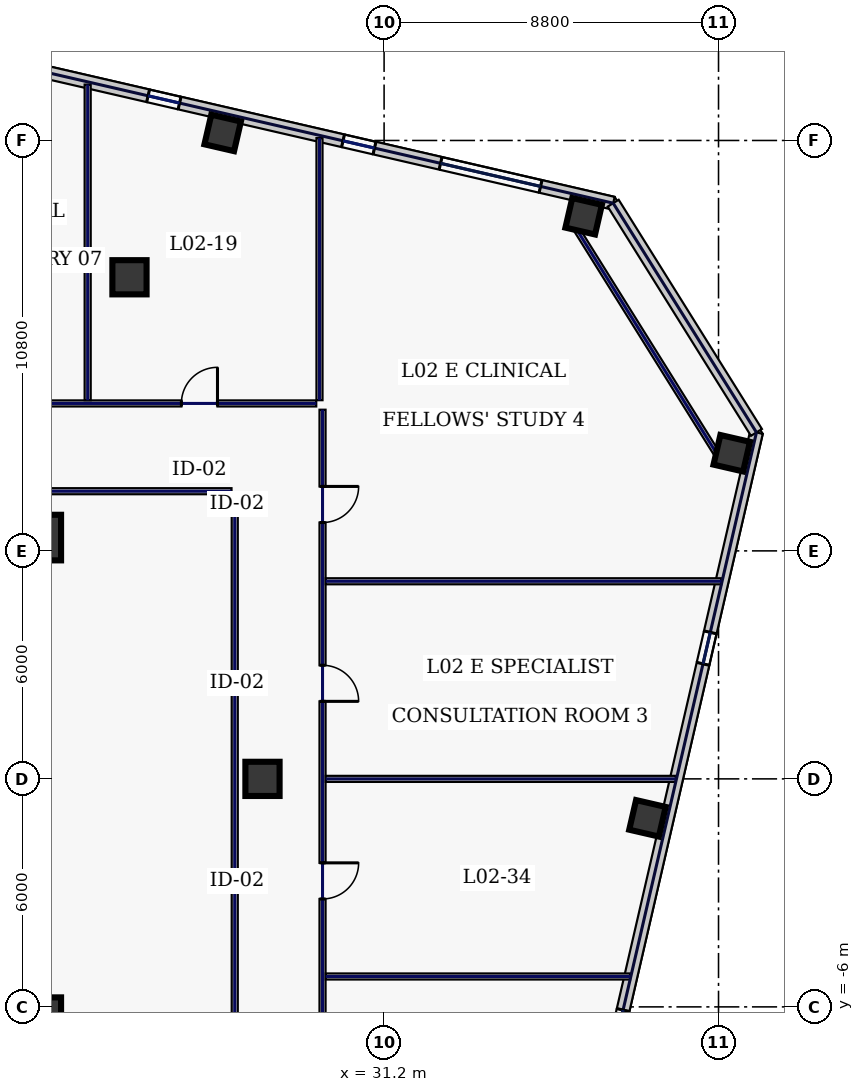
"""IFC4 building model, lengths in metres.
Left out: names, types, materials, properties, quantities, classifications, styles, units other than length and angle.
Written with IfcOpenShell. Run it as: python <this file> out.ifc"""

import sys

from ifc_helpers import new_model, si_unit, direction, frame, frame_2d, origin, origin_2d, place, context, subcontext, project, spatial, rectangle, hollow_rectangle, extrude, element, fill, save


model = new_model("IFC4")
c1 = context("Model", 3, precision=1e-05, world=origin(), true_north=direction((0.0, 1.0)))
c2 = subcontext(c1, "Body", "Model", "MODEL_VIEW")
j1 = project(units=[si_unit("LENGTHUNIT", "METRE"), si_unit("PLANEANGLEUNIT", "RADIAN")], contexts=[c1])
p1 = place(None, origin())
s1 = spatial("IfcSite", under=j1, at=p1, CompositionType="ELEMENT")
p2 = place(p1, origin())
s2 = spatial("IfcBuilding", under=s1, at=p2, CompositionType="ELEMENT")
p3 = place(p2, frame((0.0, 0.0, 13.4)))
s3 = spatial("IfcBuildingStorey", under=s2, at=p3, CompositionType="ELEMENT", Elevation=13.4)
for number, where, z_axis, x_axis in (
    (1, (22.1, -6.35, 0.0), (0.0, 0.0, 1.0), (1.0, 0.0, 0.0)),
    (2, (22.1, 6.35, 0.0), (0.0, 0.0, 1.0), (1.0, 0.0, 0.0)),
):
    element("IfcColumn", number, at=place(p3, frame(where, z_axis=z_axis, x_axis=x_axis)), inside=s3, PredefinedType="COLUMN", context=c2, shape_type="SweptSolid", body=[
        extrude(hollow_rectangle(XDim=1.2, YDim=1.2, WallThickness=0.05, at=origin_2d()), origin(), (0.0, 0.0, 1.0), 4.7),
    ])
for number, where, z_axis, x_axis in (
    (3, (24.5, 13.2, 0.0), (0.0, 0.0, 1.0), (1.0, 0.0, 0.0)),
    (4, (28.0, 0.0, 0.0), (0.0, 0.0, 1.0), (1.0, 0.0, 0.0)),
):
    element("IfcColumn", number, at=place(p3, frame(where, z_axis=z_axis, x_axis=x_axis)), inside=s3, PredefinedType="COLUMN", context=c2, shape_type="SweptSolid", body=[
        extrude(hollow_rectangle(XDim=0.9, YDim=0.9, WallThickness=0.04, at=origin_2d()), origin(), (0.0, 0.0, 1.0), 4.7),
    ])
for number, where, z_axis, x_axis in (
    (5, (36.451, 14.806, 0.0), (0.0, 0.0, 1.0), (0.974, -0.225, 0.0)),
    (6, (26.952, 16.999, 0.0), (0.0, 0.0, 1.0), (0.974, -0.225, 0.0)),
    (7, (38.13, -1.038, 0.0), (0.0, 0.0, 1.0), (0.974, -0.225, 0.0)),
    (8, (40.348, 8.57, 0.0), (0.0, 0.0, 1.0), (0.974, -0.225, 0.0)),
):
    element("IfcColumn", number, at=place(p3, frame(where, z_axis=z_axis, x_axis=x_axis)), inside=s3, PredefinedType="COLUMN", context=c2, shape_type="SweptSolid", body=[
        extrude(hollow_rectangle(XDim=0.8, YDim=0.8, WallThickness=0.036, at=origin_2d()), origin(), (0.0, 0.0, 1.0), 4.7),
    ])
p4 = place(p3, frame((37.229, 15.15, 0.0), z_axis=(0.0, 0.0, 1.0), x_axis=(-0.97436993772, 0.224951604723, 0.0)))
e9 = element("IfcWall", 9, at=p4, inside=s3, PredefinedType="STANDARD", context=c2, shape_type="SweptSolid", body=[
    extrude(rectangle(XDim=22.651, YDim=0.34, at=frame_2d((11.326, 0.0))), origin(), (0.0, 0.0, 1.0), 4.7),
])
p5 = place(p4, frame((16.195, 0.0, 0.9)))
e10 = element("IfcOpeningElement", 10, at=p5, cuts=e9, PredefinedType="OPENING", context=c2, shape_type="SweptSolid", body=[
    extrude(rectangle(XDim=2.7, YDim=2.2, at=frame_2d((1.35, 1.1))), frame((0.0, 0.18, 0.0), z_axis=(0.0, -1.0, 0.0), x_axis=(1.0, 0.0, 0.0)), (0.0, 0.0, 1.0), 0.36),
])
p6 = place(p4, frame((11.711, 0.0, 0.9)))
e11 = element("IfcOpeningElement", 11, at=p6, cuts=e9, PredefinedType="OPENING", context=c2, shape_type="SweptSolid", body=[
    extrude(rectangle(XDim=0.85, YDim=1.85, at=frame_2d((0.425, 0.925))), frame((0.0, 0.18, 0.0), z_axis=(0.0, -1.0, 0.0), x_axis=(1.0, 0.0, 0.0)), (0.0, 0.0, 1.0), 0.36),
])
p7 = place(p4, frame((6.447, 0.0, 0.9)))
e12 = element("IfcOpeningElement", 12, at=p7, cuts=e9, PredefinedType="OPENING", context=c2, shape_type="SweptSolid", body=[
    extrude(rectangle(XDim=0.85, YDim=1.85, at=frame_2d((0.425, 0.925))), frame((0.0, 0.18, 0.0), z_axis=(0.0, -1.0, 0.0), x_axis=(1.0, 0.0, 0.0)), (0.0, 0.0, 1.0), 0.36),
])
p8 = place(p4, frame((1.962, 0.0, 0.9)))
e13 = element("IfcOpeningElement", 13, at=p8, cuts=e9, PredefinedType="OPENING", context=c2, shape_type="SweptSolid", body=[
    extrude(rectangle(XDim=2.7, YDim=2.2, at=frame_2d((1.35, 1.1))), frame((0.0, 0.18, 0.0), z_axis=(0.0, -1.0, 0.0), x_axis=(1.0, 0.0, 0.0)), (0.0, 0.0, 1.0), 0.36),
])
p9 = place(p3, frame((31.82, -30.637, 0.0), z_axis=(0.0, 0.0, 1.0), x_axis=(0.224949969076, 0.974370315338, 0.0)))
e14 = element("IfcWall", 14, at=p9, inside=s3, PredefinedType="STANDARD", context=c2, shape_type="SweptSolid", body=[
    extrude(rectangle(XDim=40.8, YDim=0.34, at=frame_2d((20.4, 0.0))), origin(), (0.0, 0.0, 1.0), 4.7),
])
p10 = place(p9, frame((4.3, 0.0, 0.58)))
e15 = element("IfcOpeningElement", 15, at=p10, cuts=e14, PredefinedType="OPENING", context=c2, shape_type="SweptSolid", body=[
    extrude(rectangle(XDim=1.6, YDim=2.3, at=frame_2d((0.8, 1.15))), frame((0.0, 0.18, 0.0), z_axis=(0.0, -1.0, 0.0), x_axis=(1.0, 0.0, 0.0)), (0.0, 0.0, 1.0), 0.36),
])
p11 = place(p9, frame((14.5, 0.0, 0.58)))
e16 = element("IfcOpeningElement", 16, at=p11, cuts=e14, PredefinedType="OPENING", context=c2, shape_type="SweptSolid", body=[
    extrude(rectangle(XDim=1.6, YDim=2.3, at=frame_2d((0.8, 1.15))), frame((0.0, 0.18, 0.0), z_axis=(0.0, -1.0, 0.0), x_axis=(1.0, 0.0, 0.0)), (0.0, 0.0, 1.0), 0.36),
])
p12 = place(p9, frame((24.35, 0.0, 0.75)))
e17 = element("IfcOpeningElement", 17, at=p12, cuts=e14, PredefinedType="OPENING", context=c2, shape_type="SweptSolid", body=[
    extrude(rectangle(XDim=0.85, YDim=1.85, at=frame_2d((0.425, 0.925))), frame((0.0, 0.18, 0.0), z_axis=(0.0, -1.0, 0.0), x_axis=(1.0, 0.0, 0.0)), (0.0, 0.0, 1.0), 0.36),
])
p13 = place(p9, frame((34.55, 0.0, 0.75)))
e18 = element("IfcOpeningElement", 18, at=p13, cuts=e14, PredefinedType="OPENING", context=c2, shape_type="SweptSolid", body=[
    extrude(rectangle(XDim=0.85, YDim=1.85, at=frame_2d((0.425, 0.925))), frame((0.0, 0.18, 0.0), z_axis=(0.0, -1.0, 0.0), x_axis=(1.0, 0.0, 0.0)), (0.0, 0.0, 1.0), 0.36),
])
p14 = place(p3, frame((40.998, 9.117, 0.0), z_axis=(0.0, 0.0, 1.0), x_axis=(-0.529921811158, 0.848046504656, 0.0)))
e19 = element("IfcWall", 19, at=p14, inside=s3, PredefinedType="STANDARD", context=c2, shape_type="SweptSolid", body=[
    extrude(rectangle(XDim=7.113, YDim=0.34, at=frame_2d((3.557, 0.0))), origin(), (0.0, 0.0, 1.0), 4.7),
])
p15 = place(p3, frame((40.06, 8.389, 0.0), z_axis=(0.0, 0.0, 1.0), x_axis=(-0.529927317139, 0.848043064089, 0.0)))
e20 = element("IfcWall", 20, at=p15, inside=s3, PredefinedType="PARTITIONING", context=c2, shape_type="SweptSolid", body=[
    extrude(rectangle(XDim=7.354, YDim=0.16, at=frame_2d((3.677, 0.0))), origin(), (0.0, 0.0, 1.0), 4.7),
])
p16 = place(p3, frame((-29.415, 9.88, 0.0), z_axis=(0.0, 0.0, 1.0), x_axis=(1.0, 0.0, 0.0)))
e21 = element("IfcWall", 21, at=p16, inside=s3, PredefinedType="PARTITIONING", context=c2, shape_type="SweptSolid", body=[
    extrude(rectangle(XDim=58.83, YDim=0.16, at=frame_2d((29.415, 0.0))), origin(), (0.0, 0.0, 1.0), 4.7),
])
p17 = place(p16, frame((2.044, 0.0, 0.0)))
e22 = element("IfcOpeningElement", 22, at=p17, cuts=e21, PredefinedType="OPENING", context=c2, shape_type="SweptSolid", body=[
    extrude(rectangle(XDim=0.95, YDim=2.2, at=frame_2d((0.475, 1.1))), frame((0.0, 0.09, 0.0), z_axis=(0.0, -1.0, 0.0), x_axis=(1.0, 0.0, 0.0)), (0.0, 0.0, 1.0), 0.18),
])
p18 = place(p16, frame((7.5, 0.0, 0.0)))
e23 = element("IfcOpeningElement", 23, at=p18, cuts=e21, PredefinedType="OPENING", context=c2, shape_type="SweptSolid", body=[
    extrude(rectangle(XDim=0.95, YDim=2.2, at=frame_2d((0.475, 1.1))), frame((0.0, 0.09, 0.0), z_axis=(0.0, -1.0, 0.0), x_axis=(1.0, 0.0, 0.0)), (0.0, 0.0, 1.0), 0.18),
])
p19 = place(p16, frame((14.725, 0.0, 0.0)))
e24 = element("IfcOpeningElement", 24, at=p19, cuts=e21, PredefinedType="OPENING", context=c2, shape_type="SweptSolid", body=[
    extrude(rectangle(XDim=0.95, YDim=2.2, at=frame_2d((0.475, 1.1))), frame((0.0, 0.09, 0.0), z_axis=(0.0, -1.0, 0.0), x_axis=(1.0, 0.0, 0.0)), (0.0, 0.0, 1.0), 0.18),
])
p20 = place(p16, frame((23.025, 0.0, 0.0)))
e25 = element("IfcOpeningElement", 25, at=p20, cuts=e21, PredefinedType="OPENING", context=c2, shape_type="SweptSolid", body=[
    extrude(rectangle(XDim=0.95, YDim=2.2, at=frame_2d((0.475, 1.1))), frame((0.0, 0.09, 0.0), z_axis=(0.0, -1.0, 0.0), x_axis=(1.0, 0.0, 0.0)), (0.0, 0.0, 1.0), 0.18),
])
p21 = place(p16, frame((32.125, 0.0, 0.0)))
e26 = element("IfcOpeningElement", 26, at=p21, cuts=e21, PredefinedType="OPENING", context=c2, shape_type="SweptSolid", body=[
    extrude(rectangle(XDim=0.95, YDim=2.2, at=frame_2d((0.475, 1.1))), frame((0.0, 0.09, 0.0), z_axis=(0.0, -1.0, 0.0), x_axis=(1.0, 0.0, 0.0)), (0.0, 0.0, 1.0), 0.18),
])
p22 = place(p16, frame((41.025, 0.0, 0.0)))
e27 = element("IfcOpeningElement", 27, at=p22, cuts=e21, PredefinedType="OPENING", context=c2, shape_type="SweptSolid", body=[
    extrude(rectangle(XDim=0.95, YDim=2.2, at=frame_2d((0.475, 1.1))), frame((0.0, 0.09, 0.0), z_axis=(0.0, -1.0, 0.0), x_axis=(1.0, 0.0, 0.0)), (0.0, 0.0, 1.0), 0.18),
])
p23 = place(p16, frame((48.825, 0.0, 0.0)))
e28 = element("IfcOpeningElement", 28, at=p23, cuts=e21, PredefinedType="OPENING", context=c2, shape_type="SweptSolid", body=[
    extrude(rectangle(XDim=0.95, YDim=2.2, at=frame_2d((0.475, 1.1))), frame((0.0, 0.09, 0.0), z_axis=(0.0, -1.0, 0.0), x_axis=(1.0, 0.0, 0.0)), (0.0, 0.0, 1.0), 0.18),
])
p24 = place(p16, frame((55.281, 0.0, 0.0)))
e29 = element("IfcOpeningElement", 29, at=p24, cuts=e21, PredefinedType="OPENING", context=c2, shape_type="SweptSolid", body=[
    extrude(rectangle(XDim=0.95, YDim=2.2, at=frame_2d((0.475, 1.1))), frame((0.0, 0.09, 0.0), z_axis=(0.0, -1.0, 0.0), x_axis=(1.0, 0.0, 0.0)), (0.0, 0.0, 1.0), 0.18),
])
p25 = place(p3, frame((29.58, 9.715, 0.0), z_axis=(0.0, 0.0, 1.0), x_axis=(0.0, -1.0, 0.0)))
e30 = element("IfcWall", 30, at=p25, inside=s3, PredefinedType="PARTITIONING", context=c2, shape_type="SweptSolid", body=[
    extrude(rectangle(XDim=19.43, YDim=0.16, at=frame_2d((9.715, 0.0))), origin(), (0.0, 0.0, 1.0), 4.7),
])
p26 = place(p25, frame((16.631, 0.0, 0.0)))
e31 = element("IfcOpeningElement", 31, at=p26, cuts=e30, PredefinedType="OPENING", context=c2, shape_type="SweptSolid", body=[
    extrude(rectangle(XDim=0.95, YDim=2.2, at=frame_2d((0.475, 1.1))), frame((0.0, 0.09, 0.0), z_axis=(0.0, -1.0, 0.0), x_axis=(1.0, 0.0, 0.0)), (0.0, 0.0, 1.0), 0.18),
])
p27 = place(p25, frame((11.925, 0.0, 0.0)))
e32 = element("IfcOpeningElement", 32, at=p27, cuts=e30, PredefinedType="OPENING", context=c2, shape_type="SweptSolid", body=[
    extrude(rectangle(XDim=0.95, YDim=2.2, at=frame_2d((0.475, 1.1))), frame((0.0, 0.09, 0.0), z_axis=(0.0, -1.0, 0.0), x_axis=(1.0, 0.0, 0.0)), (0.0, 0.0, 1.0), 0.18),
])
p28 = place(p25, frame((6.725, 0.0, 0.0)))
e33 = element("IfcOpeningElement", 33, at=p28, cuts=e30, PredefinedType="OPENING", context=c2, shape_type="SweptSolid", body=[
    extrude(rectangle(XDim=0.95, YDim=2.2, at=frame_2d((0.475, 1.1))), frame((0.0, 0.09, 0.0), z_axis=(0.0, -1.0, 0.0), x_axis=(1.0, 0.0, 0.0)), (0.0, 0.0, 1.0), 0.18),
])
p29 = place(p25, frame((2.019, 0.0, 0.0)))
e34 = element("IfcOpeningElement", 34, at=p29, cuts=e30, PredefinedType="OPENING", context=c2, shape_type="SweptSolid", body=[
    extrude(rectangle(XDim=0.95, YDim=2.2, at=frame_2d((0.475, 1.1))), frame((0.0, 0.09, 0.0), z_axis=(0.0, -1.0, 0.0), x_axis=(1.0, 0.0, 0.0)), (0.0, 0.0, 1.0), 0.18),
])
p30 = place(p3, frame((27.185, 7.57, 0.0), z_axis=(0.0, 0.0, 1.0), x_axis=(-1.0, 0.0, 0.0)))
e35 = element("IfcWall", 35, at=p30, inside=s3, PredefinedType="PARTITIONING", context=c2, shape_type="SweptSolid", body=[
    extrude(rectangle(XDim=16.52, YDim=0.16, at=frame_2d((8.26, 0.0))), origin(), (0.0, 0.0, 1.0), 4.7),
])
p31 = place(p3, frame((27.27, -7.485, 0.0), z_axis=(0.0, 0.0, 1.0), x_axis=(0.0, 1.0, 0.0)))
e36 = element("IfcWall", 36, at=p31, inside=s3, PredefinedType="PARTITIONING", context=c2, shape_type="SweptSolid", body=[
    extrude(rectangle(XDim=14.97, YDim=0.16, at=frame_2d((7.485, 0.0))), origin(), (0.0, 0.0, 1.0), 4.7),
])
p32 = place(p3, frame((29.5, 9.965, 0.0), z_axis=(0.0, 0.0, 1.0), x_axis=(0.0, 1.0, 0.0)))
e37 = element("IfcWall", 37, at=p32, inside=s3, PredefinedType="PARTITIONING", context=c2, shape_type="SweptSolid", body=[
    extrude(rectangle(XDim=6.897, YDim=0.16, at=frame_2d((3.449, 0.0))), origin(), (0.0, 0.0, 1.0), 4.7),
])
p33 = place(p3, frame((23.4, 9.965, 0.0), z_axis=(0.0, 0.0, 1.0), x_axis=(0.0, 1.0, 0.0)))
e38 = element("IfcWall", 38, at=p33, inside=s3, PredefinedType="PARTITIONING", context=c2, shape_type="SweptSolid", body=[
    extrude(rectangle(XDim=8.306, YDim=0.16, at=frame_2d((4.153, 0.0))), origin(), (0.0, 0.0, 1.0), 4.7),
])
p34 = place(p3, frame((29.665, -5.2, 0.0), z_axis=(0.0, 0.0, 1.0), x_axis=(1.0, 0.0, 0.0)))
e39 = element("IfcWall", 39, at=p34, inside=s3, PredefinedType="PARTITIONING", context=c2, shape_type="SweptSolid", body=[
    extrude(rectangle(XDim=8.007, YDim=0.16, at=frame_2d((4.003, 0.0))), origin(), (0.0, 0.0, 1.0), 4.7),
])
p35 = place(p3, frame((29.665, 0.0, 0.0), z_axis=(0.0, 0.0, 1.0), x_axis=(1.0, 0.0, 0.0)))
e40 = element("IfcWall", 40, at=p35, inside=s3, PredefinedType="PARTITIONING", context=c2, shape_type="SweptSolid", body=[
    extrude(rectangle(XDim=9.208, YDim=0.16, at=frame_2d((4.604, 0.0))), origin(), (0.0, 0.0, 1.0), 4.195),
])
p36 = place(p3, frame((29.665, 5.2, 0.0), z_axis=(0.0, 0.0, 1.0), x_axis=(1.0, 0.0, 0.0)))
e41 = element("IfcWall", 41, at=p36, inside=s3, PredefinedType="PARTITIONING", context=c2, shape_type="SweptSolid", body=[
    extrude(rectangle(XDim=10.408, YDim=0.16, at=frame_2d((5.204, 0.0))), origin(), (0.0, 0.0, 1.0), 4.7),
])
p37 = place(p6, origin())
e42 = element("IfcWindow", 42, at=p37, inside=s3, PartitioningType="SINGLE_PANEL", PredefinedType="WINDOW", context=c2, shape_type="SweptSolid", body=[
    extrude(rectangle(XDim=0.85, YDim=1.85, at=frame_2d((0.425, 0.925))), frame((0.0, 0.03, 0.0), z_axis=(0.0, -1.0, 0.0), x_axis=(1.0, 0.0, 0.0)), (0.0, 0.0, 1.0), 0.06),
])
fill(e11, e42)
p38 = place(p7, origin())
e43 = element("IfcWindow", 43, at=p38, inside=s3, PartitioningType="SINGLE_PANEL", PredefinedType="WINDOW", context=c2, shape_type="SweptSolid", body=[
    extrude(rectangle(XDim=0.85, YDim=1.85, at=frame_2d((0.425, 0.925))), frame((0.0, 0.03, 0.0), z_axis=(0.0, -1.0, 0.0), x_axis=(1.0, 0.0, 0.0)), (0.0, 0.0, 1.0), 0.06),
])
fill(e12, e43)
p39 = place(p8, origin())
e44 = element("IfcWindow", 44, at=p39, inside=s3, PartitioningType="SINGLE_PANEL", PredefinedType="WINDOW", context=c2, shape_type="SweptSolid", body=[
    extrude(rectangle(XDim=2.7, YDim=2.2, at=frame_2d((1.35, 1.1))), frame((0.0, 0.03, 0.0), z_axis=(0.0, -1.0, 0.0), x_axis=(1.0, 0.0, 0.0)), (0.0, 0.0, 1.0), 0.06),
])
fill(e13, e44)
p40 = place(p12, origin())
e45 = element("IfcWindow", 45, at=p40, inside=s3, PartitioningType="SINGLE_PANEL", PredefinedType="WINDOW", context=c2, shape_type="SweptSolid", body=[
    extrude(rectangle(XDim=0.85, YDim=1.85, at=frame_2d((0.425, 0.925))), frame((0.0, 0.03, 0.0), z_axis=(0.0, -1.0, 0.0), x_axis=(1.0, 0.0, 0.0)), (0.0, 0.0, 1.0), 0.06),
])
fill(e17, e45)
p41 = place(p13, origin())
e46 = element("IfcWindow", 46, at=p41, inside=s3, PartitioningType="SINGLE_PANEL", PredefinedType="WINDOW", context=c2, shape_type="SweptSolid", body=[
    extrude(rectangle(XDim=0.85, YDim=1.85, at=frame_2d((0.425, 0.925))), frame((0.0, 0.03, 0.0), z_axis=(0.0, -1.0, 0.0), x_axis=(1.0, 0.0, 0.0)), (0.0, 0.0, 1.0), 0.06),
])
fill(e18, e46)
p42 = place(p24, origin())
e47 = element("IfcDoor", 47, at=p42, inside=s3, OperationType="SINGLE_SWING_RIGHT", PredefinedType="DOOR", context=c2, shape_type="SweptSolid", body=[
    extrude(rectangle(XDim=0.95, YDim=2.2, at=frame_2d((0.475, 1.1))), frame((0.0, 0.025, 0.0), z_axis=(0.0, -1.0, 0.0), x_axis=(1.0, 0.0, 0.0)), (0.0, 0.0, 1.0), 0.05),
])
fill(e29, e47)
p43 = place(p27, origin())
e48 = element("IfcDoor", 48, at=p43, inside=s3, OperationType="SINGLE_SWING_LEFT", PredefinedType="DOOR", context=c2, shape_type="SweptSolid", body=[
    extrude(rectangle(XDim=0.95, YDim=2.2, at=frame_2d((0.475, 1.1))), frame((0.0, 0.025, 0.0), z_axis=(0.0, -1.0, 0.0), x_axis=(1.0, 0.0, 0.0)), (0.0, 0.0, 1.0), 0.05),
])
fill(e32, e48)
p44 = place(p28, origin())
e49 = element("IfcDoor", 49, at=p44, inside=s3, OperationType="SINGLE_SWING_RIGHT", PredefinedType="DOOR", context=c2, shape_type="SweptSolid", body=[
    extrude(rectangle(XDim=0.95, YDim=2.2, at=frame_2d((0.475, 1.1))), frame((0.0, 0.025, 0.0), z_axis=(0.0, -1.0, 0.0), x_axis=(1.0, 0.0, 0.0)), (0.0, 0.0, 1.0), 0.05),
])
fill(e33, e49)
p45 = place(p29, origin())
e50 = element("IfcDoor", 50, at=p45, inside=s3, OperationType="SINGLE_SWING_LEFT", PredefinedType="DOOR", context=c2, shape_type="SweptSolid", body=[
    extrude(rectangle(XDim=0.95, YDim=2.2, at=frame_2d((0.475, 1.1))), frame((0.0, 0.025, 0.0), z_axis=(0.0, -1.0, 0.0), x_axis=(1.0, 0.0, 0.0)), (0.0, 0.0, 1.0), 0.05),
])
fill(e34, e50)
save(model, sys.argv[1])
